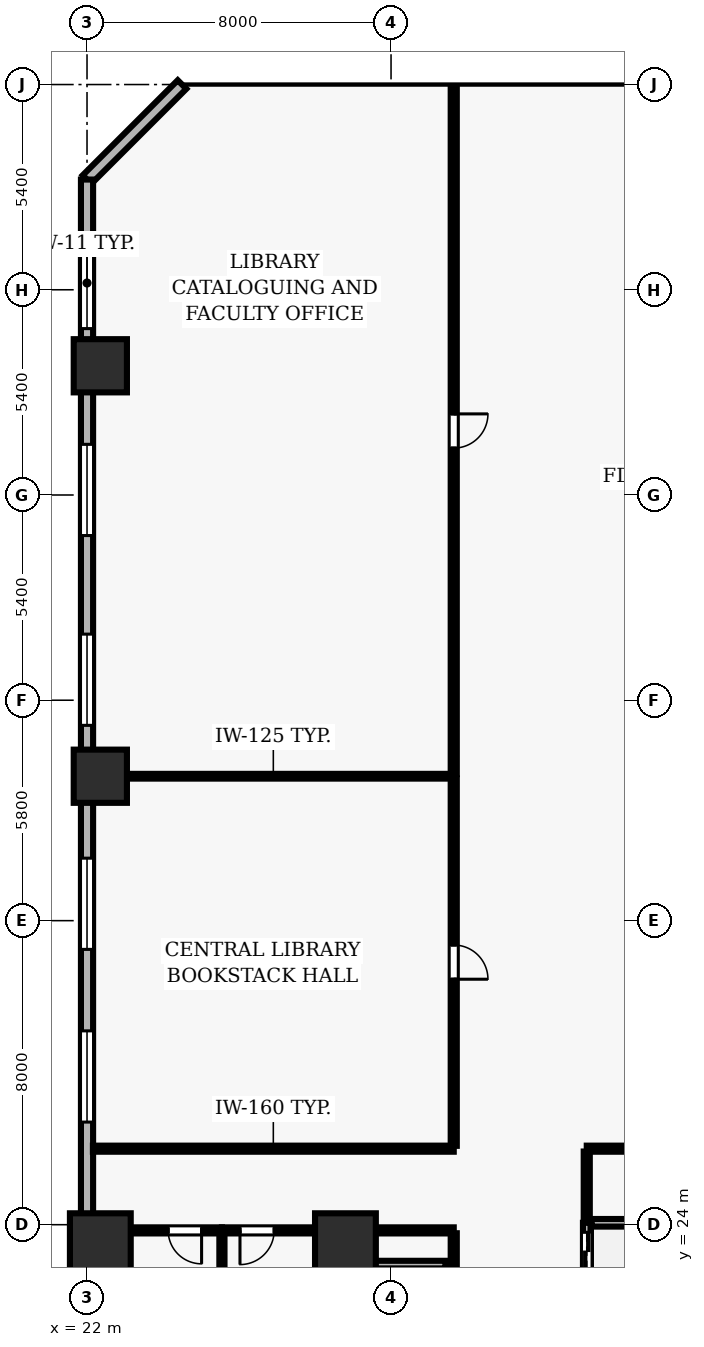
"""IFC4 building model, lengths in metres.
Left out: names, types, materials, properties, quantities, classifications, styles, units other than length and angle.
Written with IfcOpenShell. Run it as: python <this file> out.ifc"""

import sys

from ifc_helpers import new_model, si_unit, direction, frame, frame_2d, origin, origin_2d, place, context, subcontext, project, spatial, rectangle, extrude, element, fill, save


model = new_model("IFC4")
c1 = context("Model", 3, precision=1e-05, world=origin(), true_north=direction((0.0, 1.0)))
c2 = subcontext(c1, "Body", "Model", "MODEL_VIEW")
j1 = project(units=[si_unit("LENGTHUNIT", "METRE"), si_unit("PLANEANGLEUNIT", "RADIAN")], contexts=[c1])
p1 = place(None, origin())
s1 = spatial("IfcSite", under=j1, at=p1, CompositionType="ELEMENT")
p2 = place(p1, origin())
s2 = spatial("IfcBuilding", under=s1, at=p2, CompositionType="ELEMENT")
p3 = place(p2, frame((0.0, 0.0, 5.2)))
s3 = spatial("IfcBuildingStorey", under=s2, at=p3, CompositionType="ELEMENT", Elevation=5.2)
for number, where, z_axis, x_axis in (
    (1, (22.35, 23.5, 0.0), (0.0, 0.0, 1.0), (1.0, 0.0, 0.0)),
    (2, (28.8, 23.5, 0.0), (0.0, 0.0, 1.0), (1.0, 0.0, 0.0)),
):
    element("IfcColumn", number, at=place(p3, frame(where, z_axis=z_axis, x_axis=x_axis)), inside=s3, PredefinedType="COLUMN", context=c2, shape_type="SweptSolid", body=[
        extrude(rectangle(XDim=1.6, YDim=1.6, at=origin_2d()), origin(), (0.0, 0.0, 1.0), 5.2),
    ])
for number, where, z_axis, x_axis in (
    (3, (22.35, 35.8, 0.0), (0.0, 0.0, 1.0), (1.0, 0.0, 0.0)),
    (4, (22.35, 46.6, 0.0), (0.0, 0.0, 1.0), (1.0, 0.0, 0.0)),
):
    element("IfcColumn", number, at=place(p3, frame(where, z_axis=z_axis, x_axis=x_axis)), inside=s3, PredefinedType="COLUMN", context=c2, shape_type="SweptSolid", body=[
        extrude(rectangle(XDim=1.4, YDim=1.4, at=origin_2d()), origin(), (0.0, 0.0, 1.0), 5.2),
    ])
p4 = place(p3, frame((24.5, 54.0, 0.0), z_axis=(0.0, 0.0, 1.0), x_axis=(-0.707106781187, -0.707106781187, 0.0)))
e5 = element("IfcWall", 5, at=p4, inside=s3, PredefinedType="SOLIDWALL", context=c2, shape_type="SweptSolid", body=[
    extrude(rectangle(XDim=3.536, YDim=0.32, at=frame_2d((1.768, 0.0))), origin(), (0.0, 0.0, 1.0), 4.92),
])
p5 = place(p3, frame((22.0, 51.5, 0.0), z_axis=(0.0, 0.0, 1.0), x_axis=(0.0, -1.0, 0.0)))
e6 = element("IfcWall", 6, at=p5, inside=s3, PredefinedType="SOLIDWALL", context=c2, shape_type="SweptSolid", body=[
    extrude(rectangle(XDim=49.0, YDim=0.32, at=frame_2d((24.5, 0.0))), origin(), (0.0, 0.0, 1.0), 4.92),
])
p6 = place(p5, frame((1.522, 0.0, 0.9)))
e7 = element("IfcOpeningElement", 7, at=p6, cuts=e6, PredefinedType="OPENING", context=c2, shape_type="SweptSolid", body=[
    extrude(rectangle(XDim=2.4, YDim=2.2, at=frame_2d((1.2, 1.1))), frame((0.0, 0.17, 0.0), z_axis=(0.0, -1.0, 0.0), x_axis=(1.0, 0.0, 0.0)), (0.0, 0.0, 1.0), 0.34),
])
p7 = place(p5, frame((6.967, 0.0, 0.9)))
e8 = element("IfcOpeningElement", 8, at=p7, cuts=e6, PredefinedType="OPENING", context=c2, shape_type="SweptSolid", body=[
    extrude(rectangle(XDim=2.4, YDim=2.2, at=frame_2d((1.2, 1.1))), frame((0.0, 0.17, 0.0), z_axis=(0.0, -1.0, 0.0), x_axis=(1.0, 0.0, 0.0)), (0.0, 0.0, 1.0), 0.34),
])
p8 = place(p5, frame((11.961, 0.0, 0.9)))
e9 = element("IfcOpeningElement", 9, at=p8, cuts=e6, PredefinedType="OPENING", context=c2, shape_type="SweptSolid", body=[
    extrude(rectangle(XDim=2.4, YDim=2.2, at=frame_2d((1.2, 1.1))), frame((0.0, 0.17, 0.0), z_axis=(0.0, -1.0, 0.0), x_axis=(1.0, 0.0, 0.0)), (0.0, 0.0, 1.0), 0.34),
])
p9 = place(p5, frame((17.856, 0.0, 0.9)))
e10 = element("IfcOpeningElement", 10, at=p9, cuts=e6, PredefinedType="OPENING", context=c2, shape_type="SweptSolid", body=[
    extrude(rectangle(XDim=2.4, YDim=2.2, at=frame_2d((1.2, 1.1))), frame((0.0, 0.17, 0.0), z_axis=(0.0, -1.0, 0.0), x_axis=(1.0, 0.0, 0.0)), (0.0, 0.0, 1.0), 0.34),
])
p10 = place(p5, frame((22.4, 0.0, 0.9)))
e11 = element("IfcOpeningElement", 11, at=p10, cuts=e6, PredefinedType="OPENING", context=c2, shape_type="SweptSolid", body=[
    extrude(rectangle(XDim=2.4, YDim=2.2, at=frame_2d((1.2, 1.1))), frame((0.0, 0.17, 0.0), z_axis=(0.0, -1.0, 0.0), x_axis=(1.0, 0.0, 0.0)), (0.0, 0.0, 1.0), 0.34),
])
p11 = place(p5, frame((29.194, 0.0, 0.9)))
e12 = element("IfcOpeningElement", 12, at=p11, cuts=e6, PredefinedType="OPENING", context=c2, shape_type="SweptSolid", body=[
    extrude(rectangle(XDim=2.4, YDim=2.2, at=frame_2d((1.2, 1.1))), frame((0.0, 0.17, 0.0), z_axis=(0.0, -1.0, 0.0), x_axis=(1.0, 0.0, 0.0)), (0.0, 0.0, 1.0), 0.34),
])
p12 = place(p5, frame((33.289, 0.0, 0.9)))
e13 = element("IfcOpeningElement", 13, at=p12, cuts=e6, PredefinedType="OPENING", context=c2, shape_type="SweptSolid", body=[
    extrude(rectangle(XDim=2.4, YDim=2.2, at=frame_2d((1.2, 1.1))), frame((0.0, 0.17, 0.0), z_axis=(0.0, -1.0, 0.0), x_axis=(1.0, 0.0, 0.0)), (0.0, 0.0, 1.0), 0.34),
])
p13 = place(p5, frame((39.633, 0.0, 0.9)))
e14 = element("IfcOpeningElement", 14, at=p13, cuts=e6, PredefinedType="OPENING", context=c2, shape_type="SweptSolid", body=[
    extrude(rectangle(XDim=2.4, YDim=2.2, at=frame_2d((1.2, 1.1))), frame((0.0, 0.17, 0.0), z_axis=(0.0, -1.0, 0.0), x_axis=(1.0, 0.0, 0.0)), (0.0, 0.0, 1.0), 0.34),
])
p14 = place(p3, frame((35.15, 24.05, 0.0), z_axis=(0.0, 0.0, 1.0), x_axis=(0.0, -1.0, 0.0)))
e15 = element("IfcWall", 15, at=p14, inside=s3, PredefinedType="SOLIDWALL", context=c2, shape_type="SweptSolid", body=[
    extrude(rectangle(XDim=1.5, YDim=0.2, at=frame_2d((0.75, 0.0))), origin(), (0.0, 0.0, 1.0), 4.92),
])
p15 = place(p14, frame((0.25, 0.0, 0.0)))
e16 = element("IfcOpeningElement", 16, at=p15, cuts=e15, PredefinedType="OPENING", context=c2, shape_type="SweptSolid", body=[
    extrude(rectangle(XDim=1.0, YDim=2.1, at=frame_2d((0.5, 1.05))), frame((0.0, 0.11, 0.0), z_axis=(0.0, -1.0, 0.0), x_axis=(1.0, 0.0, 0.0)), (0.0, 0.0, 1.0), 0.22),
])
p16 = place(p3, frame((37.42, 24.05, 0.0), z_axis=(0.0, 0.0, 1.0), x_axis=(-1.0, 0.0, 0.0)))
e17 = element("IfcWall", 17, at=p16, inside=s3, PredefinedType="SOLIDWALL", context=c2, shape_type="SweptSolid", body=[
    extrude(rectangle(XDim=2.14, YDim=0.2, at=frame_2d((1.07, 0.0))), origin(), (0.0, 0.0, 1.0), 4.92),
])
p17 = place(p3, frame((28.85, 22.95, 0.0), z_axis=(0.0, 0.0, 1.0), x_axis=(0.0, -1.0, 0.0)))
e18 = element("IfcWall", 18, at=p17, inside=s3, PredefinedType="SOLIDWALL", context=c2, shape_type="SweptSolid", body=[
    extrude(rectangle(XDim=1.9, YDim=0.2, at=frame_2d((0.95, 0.0))), origin(), (0.0, 0.0, 1.0), 4.92),
])
p18 = place(p3, frame((31.55, 21.05, 0.0), z_axis=(0.0, 0.0, 1.0), x_axis=(0.0, 1.0, 0.0)))
e19 = element("IfcWall", 19, at=p18, inside=s3, PredefinedType="SOLIDWALL", context=c2, shape_type="SweptSolid", body=[
    extrude(rectangle(XDim=1.9, YDim=0.2, at=frame_2d((0.95, 0.0))), origin(), (0.0, 0.0, 1.0), 4.92),
])
p19 = place(p18, frame((0.45, 0.0, 0.0)))
e20 = element("IfcOpeningElement", 20, at=p19, cuts=e19, PredefinedType="OPENING", context=c2, shape_type="SweptSolid", body=[
    extrude(rectangle(XDim=1.0, YDim=2.1, at=frame_2d((0.5, 1.05))), frame((0.0, 0.11, 0.0), z_axis=(0.0, -1.0, 0.0), x_axis=(1.0, 0.0, 0.0)), (0.0, 0.0, 1.0), 0.22),
])
p20 = place(p3, frame((31.43, 22.95, 0.0), z_axis=(0.0, 0.0, 1.0), x_axis=(-1.0, 0.0, 0.0)))
e21 = element("IfcWall", 21, at=p20, inside=s3, PredefinedType="SOLIDWALL", context=c2, shape_type="SweptSolid", body=[
    extrude(rectangle(XDim=2.46, YDim=0.2, at=frame_2d((1.23, 0.0))), origin(), (0.0, 0.0, 1.0), 4.92),
])
p21 = place(p3, frame((25.55, 23.85, 0.0), z_axis=(0.0, 0.0, 1.0), x_axis=(-1.0, 0.0, 0.0)))
e22 = element("IfcWall", 22, at=p21, inside=s3, PredefinedType="PARTITIONING", context=c2, shape_type="SweptSolid", body=[
    extrude(rectangle(XDim=3.35, YDim=0.16, at=frame_2d((1.675, 0.0))), origin(), (0.0, 0.0, 1.0), 4.065),
])
p22 = place(p21, frame((0.535, 0.0, 0.0)))
e23 = element("IfcOpeningElement", 23, at=p22, cuts=e22, PredefinedType="OPENING", context=c2, shape_type="SweptSolid", body=[
    extrude(rectangle(XDim=0.88, YDim=2.1, at=frame_2d((0.44, 1.05))), frame((0.0, 0.09, 0.0), z_axis=(0.0, -1.0, 0.0), x_axis=(1.0, 0.0, 0.0)), (0.0, 0.0, 1.0), 0.18),
])
p23 = place(p3, frame((28.8, 23.85, 0.0), z_axis=(0.0, 0.0, 1.0), x_axis=(-1.0, 0.0, 0.0)))
e24 = element("IfcWall", 24, at=p23, inside=s3, PredefinedType="PARTITIONING", context=c2, shape_type="SweptSolid", body=[
    extrude(rectangle(XDim=3.25, YDim=0.16, at=frame_2d((1.625, 0.0))), origin(), (0.0, 0.0, 1.0), 4.065),
])
p24 = place(p23, frame((1.875, 0.0, 0.0)))
e25 = element("IfcOpeningElement", 25, at=p24, cuts=e24, PredefinedType="OPENING", context=c2, shape_type="SweptSolid", body=[
    extrude(rectangle(XDim=0.9, YDim=2.1, at=frame_2d((0.45, 1.05))), frame((0.0, 0.09, 0.0), z_axis=(0.0, -1.0, 0.0), x_axis=(1.0, 0.0, 0.0)), (0.0, 0.0, 1.0), 0.18),
])
p25 = place(p3, frame((28.8, 23.85, 0.0), z_axis=(0.0, 0.0, 1.0), x_axis=(1.0, 0.0, 0.0)))
e26 = element("IfcWall", 26, at=p25, inside=s3, PredefinedType="PARTITIONING", context=c2, shape_type="SweptSolid", body=[
    extrude(rectangle(XDim=2.85, YDim=0.16, at=frame_2d((1.425, 0.0))), origin(), (0.0, 0.0, 1.0), 4.92),
])
p26 = place(p3, frame((31.65, 26.0, 0.0), z_axis=(0.0, 0.0, 1.0), x_axis=(-1.0, 0.0, 0.0)))
e27 = element("IfcWall", 27, at=p26, inside=s3, PredefinedType="PARTITIONING", context=c2, shape_type="SweptSolid", body=[
    extrude(rectangle(XDim=9.495, YDim=0.16, at=frame_2d((4.748, 0.0))), origin(), (0.0, 0.0, 1.0), 4.92),
])
p27 = place(p3, frame((31.65, 35.8, 0.0), z_axis=(0.0, 0.0, 1.0), x_axis=(-1.0, 0.0, 0.0)))
e28 = element("IfcWall", 28, at=p27, inside=s3, PredefinedType="PARTITIONING", context=c2, shape_type="SweptSolid", body=[
    extrude(rectangle(XDim=9.495, YDim=0.125, at=frame_2d((4.748, 0.0))), origin(), (0.0, 0.0, 1.0), 3.72),
])
p28 = place(p3, frame((35.15, 26.0, 0.0), z_axis=(0.0, 0.0, 1.0), x_axis=(1.0, 0.0, 0.0)))
e29 = element("IfcWall", 29, at=p28, inside=s3, PredefinedType="PARTITIONING", context=c2, shape_type="SweptSolid", body=[
    extrude(rectangle(XDim=3.1, YDim=0.16, at=frame_2d((1.55, 0.0))), origin(), (0.0, 0.0, 1.0), 4.92),
])
p29 = place(p3, frame((25.55, 19.16, 0.0), z_axis=(0.0, 0.0, 1.0), x_axis=(0.0, 1.0, 0.0)))
e30 = element("IfcWall", 30, at=p29, inside=s3, PredefinedType="PARTITIONING", context=c2, shape_type="SweptSolid", body=[
    extrude(rectangle(XDim=4.615, YDim=0.135, at=frame_2d((2.308, 0.0))), origin(), (0.0, 0.0, 1.0), 4.92),
])
p30 = place(p3, frame((28.8, 22.95, 0.0), z_axis=(0.0, 0.0, 1.0), x_axis=(0.0, 1.0, 0.0)))
e31 = element("IfcWall", 31, at=p30, inside=s3, PredefinedType="PARTITIONING", context=c2, shape_type="SweptSolid", body=[
    extrude(rectangle(XDim=0.825, YDim=0.125, at=frame_2d((0.413, 0.0))), origin(), (0.0, 0.0, 1.0), 4.92),
])
p31 = place(p3, frame((31.65, 23.775, 0.0), z_axis=(0.0, 0.0, 1.0), x_axis=(0.0, -1.0, 0.0)))
e32 = element("IfcWall", 32, at=p31, inside=s3, PredefinedType="PARTITIONING", context=c2, shape_type="SweptSolid", body=[
    extrude(rectangle(XDim=0.825, YDim=0.16, at=frame_2d((0.413, 0.0))), origin(), (0.0, 0.0, 1.0), 4.92),
])
p32 = place(p3, frame((31.65, 35.742, 0.0), z_axis=(0.0, 0.0, 1.0), x_axis=(0.0, -1.0, 0.0)))
e33 = element("IfcWall", 33, at=p32, inside=s3, PredefinedType="PARTITIONING", context=c2, shape_type="SweptSolid", body=[
    extrude(rectangle(XDim=9.667, YDim=0.16, at=frame_2d((4.833, 0.0))), origin(), (0.0, 0.0, 1.0), 4.92),
])
p33 = place(p32, frame((4.383, 0.0, 0.0)))
e34 = element("IfcOpeningElement", 34, at=p33, cuts=e33, PredefinedType="OPENING", context=c2, shape_type="SweptSolid", body=[
    extrude(rectangle(XDim=0.9, YDim=2.1, at=frame_2d((0.45, 1.05))), frame((0.0, 0.09, 0.0), z_axis=(0.0, -1.0, 0.0), x_axis=(1.0, 0.0, 0.0)), (0.0, 0.0, 1.0), 0.18),
])
p34 = place(p3, frame((31.65, 53.91, 0.0), z_axis=(0.0, 0.0, 1.0), x_axis=(0.0, -1.0, 0.0)))
e35 = element("IfcWall", 35, at=p34, inside=s3, PredefinedType="PARTITIONING", context=c2, shape_type="SweptSolid", body=[
    extrude(rectangle(XDim=18.053, YDim=0.16, at=frame_2d((9.026, 0.0))), origin(), (0.0, 0.0, 1.0), 4.92),
])
p35 = place(p34, frame((8.576, 0.0, 0.0)))
e36 = element("IfcOpeningElement", 36, at=p35, cuts=e35, PredefinedType="OPENING", context=c2, shape_type="SweptSolid", body=[
    extrude(rectangle(XDim=0.9, YDim=2.1, at=frame_2d((0.45, 1.05))), frame((0.0, 0.09, 0.0), z_axis=(0.0, -1.0, 0.0), x_axis=(1.0, 0.0, 0.0)), (0.0, 0.0, 1.0), 0.18),
])
p36 = place(p3, frame((35.15, 24.07, 0.0), z_axis=(0.0, 0.0, 1.0), x_axis=(0.0, 1.0, 0.0)))
e37 = element("IfcWall", 37, at=p36, inside=s3, PredefinedType="PARTITIONING", context=c2, shape_type="SweptSolid", body=[
    extrude(rectangle(XDim=1.855, YDim=0.16, at=frame_2d((0.927, 0.0))), origin(), (0.0, 0.0, 1.0), 4.92),
])
p37 = place(p6, origin())
e38 = element("IfcWindow", 38, at=p37, inside=s3, PartitioningType="SINGLE_PANEL", PredefinedType="WINDOW", context=c2, shape_type="SweptSolid", body=[
    extrude(rectangle(XDim=2.4, YDim=2.2, at=frame_2d((1.2, 1.1))), frame((0.0, 0.03, 0.0), z_axis=(0.0, -1.0, 0.0), x_axis=(1.0, 0.0, 0.0)), (0.0, 0.0, 1.0), 0.06),
])
fill(e7, e38)
p38 = place(p7, origin())
e39 = element("IfcWindow", 39, at=p38, inside=s3, PartitioningType="SINGLE_PANEL", PredefinedType="WINDOW", context=c2, shape_type="SweptSolid", body=[
    extrude(rectangle(XDim=2.4, YDim=2.2, at=frame_2d((1.2, 1.1))), frame((0.0, 0.03, 0.0), z_axis=(0.0, -1.0, 0.0), x_axis=(1.0, 0.0, 0.0)), (0.0, 0.0, 1.0), 0.06),
])
fill(e8, e39)
p39 = place(p8, origin())
e40 = element("IfcWindow", 40, at=p39, inside=s3, PartitioningType="SINGLE_PANEL", PredefinedType="WINDOW", context=c2, shape_type="SweptSolid", body=[
    extrude(rectangle(XDim=2.4, YDim=2.2, at=frame_2d((1.2, 1.1))), frame((0.0, 0.03, 0.0), z_axis=(0.0, -1.0, 0.0), x_axis=(1.0, 0.0, 0.0)), (0.0, 0.0, 1.0), 0.06),
])
fill(e9, e40)
p40 = place(p9, origin())
e41 = element("IfcWindow", 41, at=p40, inside=s3, PartitioningType="SINGLE_PANEL", PredefinedType="WINDOW", context=c2, shape_type="SweptSolid", body=[
    extrude(rectangle(XDim=2.4, YDim=2.2, at=frame_2d((1.2, 1.1))), frame((0.0, 0.03, 0.0), z_axis=(0.0, -1.0, 0.0), x_axis=(1.0, 0.0, 0.0)), (0.0, 0.0, 1.0), 0.06),
])
fill(e10, e41)
p41 = place(p10, origin())
e42 = element("IfcWindow", 42, at=p41, inside=s3, PartitioningType="SINGLE_PANEL", PredefinedType="WINDOW", context=c2, shape_type="SweptSolid", body=[
    extrude(rectangle(XDim=2.4, YDim=2.2, at=frame_2d((1.2, 1.1))), frame((0.0, 0.03, 0.0), z_axis=(0.0, -1.0, 0.0), x_axis=(1.0, 0.0, 0.0)), (0.0, 0.0, 1.0), 0.06),
])
fill(e11, e42)
p42 = place(p15, origin())
e43 = element("IfcDoor", 43, at=p42, inside=s3, OperationType="DOUBLE_DOOR_SLIDING", PredefinedType="DOOR", context=c2, shape_type="SweptSolid", body=[
    extrude(rectangle(XDim=1.0, YDim=2.1, at=frame_2d((0.5, 1.05))), frame((0.0, 0.025, 0.0), z_axis=(0.0, -1.0, 0.0), x_axis=(1.0, 0.0, 0.0)), (0.0, 0.0, 1.0), 0.05),
])
fill(e16, e43)
p43 = place(p22, origin())
e44 = element("IfcDoor", 44, at=p43, inside=s3, OperationType="SINGLE_SWING_LEFT", PredefinedType="DOOR", context=c2, shape_type="SweptSolid", body=[
    extrude(rectangle(XDim=0.88, YDim=2.1, at=frame_2d((0.44, 1.05))), frame((0.0, 0.025, 0.0), z_axis=(0.0, -1.0, 0.0), x_axis=(1.0, 0.0, 0.0)), (0.0, 0.0, 1.0), 0.05),
])
fill(e23, e44)
p44 = place(p24, origin())
e45 = element("IfcDoor", 45, at=p44, inside=s3, OperationType="SINGLE_SWING_RIGHT", PredefinedType="DOOR", context=c2, shape_type="SweptSolid", body=[
    extrude(rectangle(XDim=0.9, YDim=2.1, at=frame_2d((0.45, 1.05))), frame((0.0, 0.025, 0.0), z_axis=(0.0, -1.0, 0.0), x_axis=(1.0, 0.0, 0.0)), (0.0, 0.0, 1.0), 0.05),
])
fill(e25, e45)
p45 = place(p33, origin())
e46 = element("IfcDoor", 46, at=p45, inside=s3, OperationType="SINGLE_SWING_RIGHT", PredefinedType="DOOR", context=c2, shape_type="SweptSolid", body=[
    extrude(rectangle(XDim=0.9, YDim=2.1, at=frame_2d((0.45, 1.05))), frame((0.0, 0.025, 0.0), z_axis=(0.0, -1.0, 0.0), x_axis=(1.0, 0.0, 0.0)), (0.0, 0.0, 1.0), 0.05),
])
fill(e34, e46)
p46 = place(p35, origin())
e47 = element("IfcDoor", 47, at=p46, inside=s3, OperationType="SINGLE_SWING_LEFT", PredefinedType="DOOR", context=c2, shape_type="SweptSolid", body=[
    extrude(rectangle(XDim=0.9, YDim=2.1, at=frame_2d((0.45, 1.05))), frame((0.0, 0.025, 0.0), z_axis=(0.0, -1.0, 0.0), x_axis=(1.0, 0.0, 0.0)), (0.0, 0.0, 1.0), 0.05),
])
fill(e36, e47)
save(model, sys.argv[1])
